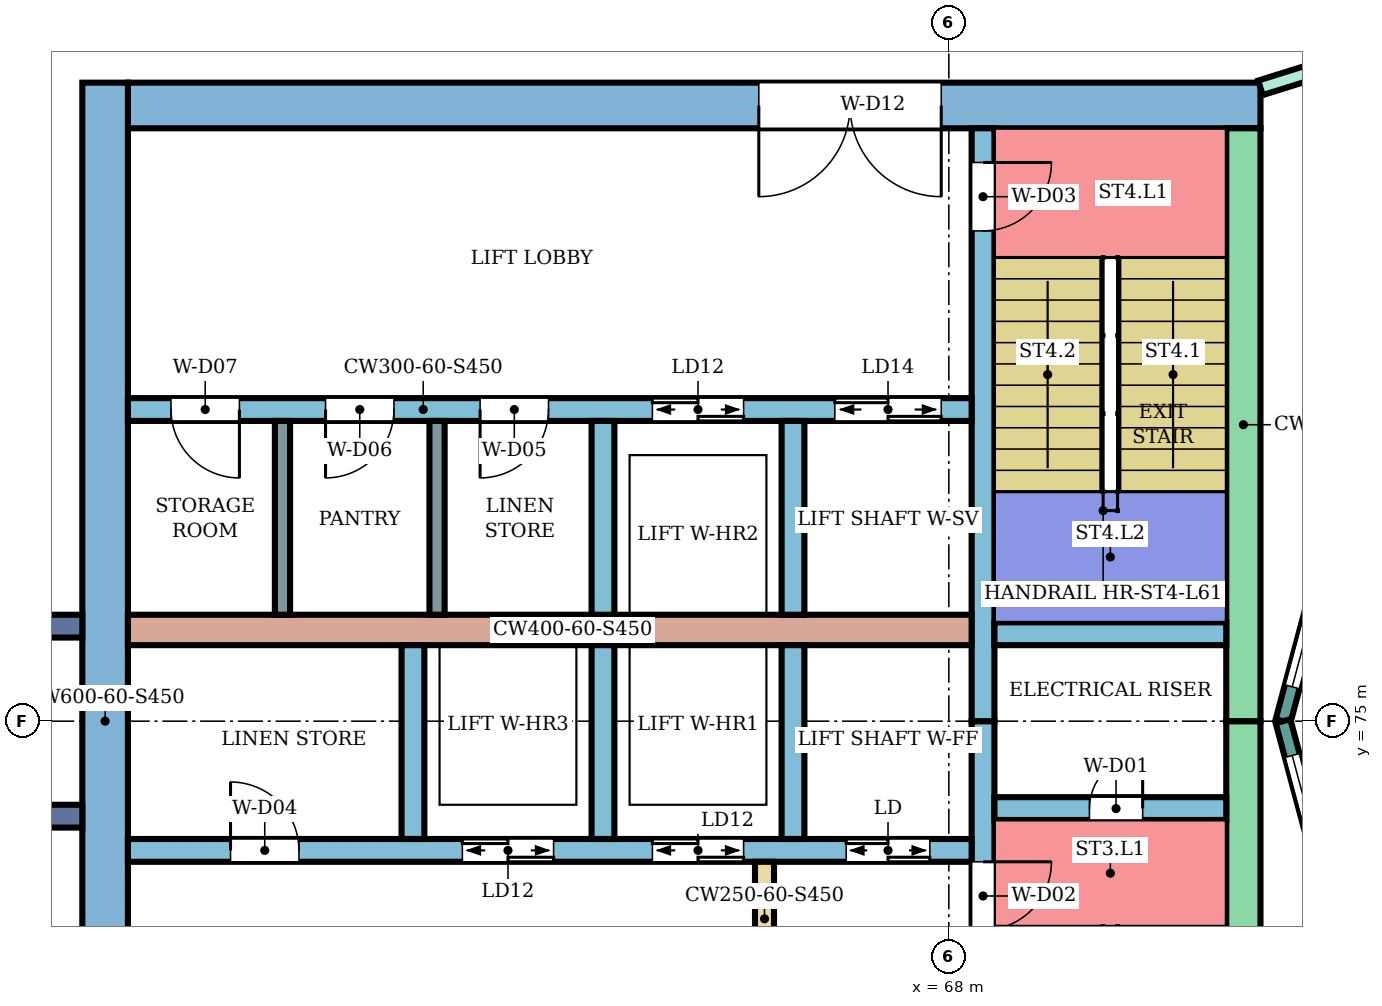
"""IFC4 building model, lengths in metres.
Left out: names, types, materials, properties, quantities, classifications, styles, units other than length and angle.
Written with IfcOpenShell. Run it as: python <this file> out.ifc"""

import sys

from ifc_helpers import new_model, si_unit, direction, frame, frame_2d, origin, place, context, subcontext, project, spatial, rectangle, extrude, element, fill, save


model = new_model("IFC4")
c1 = context("Model", 3, precision=1e-05, world=origin(), true_north=direction((0.0, 1.0)))
c2 = subcontext(c1, "Body", "Model", "MODEL_VIEW")
j1 = project(units=[si_unit("LENGTHUNIT", "METRE"), si_unit("PLANEANGLEUNIT", "RADIAN")], contexts=[c1])
p1 = place(None, origin())
s1 = spatial("IfcSite", under=j1, at=p1, CompositionType="ELEMENT")
p2 = place(p1, origin())
s2 = spatial("IfcBuilding", under=s1, at=p2, CompositionType="ELEMENT")
p3 = place(p2, frame((0.0, 0.0, 266.7)))
s3 = spatial("IfcBuildingStorey", under=s2, at=p3, CompositionType="ELEMENT", Elevation=266.7)
p4 = place(p3, frame((72.1, 83.1, 0.0), z_axis=(0.0, 0.0, 1.0), x_axis=(-1.0, 0.0, 0.0)))
e1 = element("IfcWall", 1, at=p4, inside=s3, PredefinedType="SHEAR", context=c2, shape_type="SweptSolid", body=[
    extrude(rectangle(XDim=14.9, YDim=0.6, at=frame_2d((7.45, 0.0))), origin(), (0.0, 0.0, 1.0), 3.75),
])
p5 = place(p4, frame((4.2, 0.0, 0.0)))
e2 = element("IfcOpeningElement", 2, at=p5, cuts=e1, PredefinedType="OPENING", context=c2, shape_type="SweptSolid", body=[
    extrude(rectangle(XDim=2.4, YDim=2.4, at=frame_2d((1.2, 1.2))), frame((0.0, 0.31, 0.0), z_axis=(0.0, -1.0, 0.0), x_axis=(1.0, 0.0, 0.0)), (0.0, 0.0, 1.0), 0.62),
])
for number, where, z_axis, x_axis in (
    (3, (71.875, 75.0, 0.0), (0.0, 0.0, 1.0), (0.0, -1.0, 0.0)),
    (4, (71.875, 82.8, 0.0), (0.0, 0.0, 1.0), (0.0, -1.0, 0.0)),
):
    element("IfcWall", number, at=place(p3, frame(where, z_axis=z_axis, x_axis=x_axis)), inside=s3, PredefinedType="SHEAR", context=c2, shape_type="SweptSolid", body=[
        extrude(rectangle(XDim=7.8, YDim=0.45, at=frame_2d((3.9, 0.0))), origin(), (0.0, 0.0, 1.0), 3.75),
    ])
p6 = place(p3, frame((56.9, 83.4, 0.0), z_axis=(0.0, 0.0, 1.0), x_axis=(0.0, -1.0, 0.0)))
e5 = element("IfcWall", 5, at=p6, inside=s3, PredefinedType="SHEAR", context=c2, shape_type="SweptSolid", body=[
    extrude(rectangle(XDim=16.8, YDim=0.6, at=frame_2d((8.4, 0.0))), origin(), (0.0, 0.0, 1.0), 3.75),
])
p7 = place(p3, frame((68.45, 75.0, 0.0), z_axis=(0.0, 0.0, 1.0), x_axis=(0.0, -1.0, 0.0)))
e6 = element("IfcWall", 6, at=p7, inside=s3, PredefinedType="SHEAR", context=c2, shape_type="SweptSolid", body=[
    extrude(rectangle(XDim=7.8, YDim=0.3, at=frame_2d((3.9, 0.0))), origin(), (0.0, 0.0, 1.0), 3.75),
])
p8 = place(p7, frame((1.85, 0.0, 0.0)))
e7 = element("IfcOpeningElement", 7, at=p8, cuts=e6, PredefinedType="OPENING", context=c2, shape_type="SweptSolid", body=[
    extrude(rectangle(XDim=0.9, YDim=2.1, at=frame_2d((0.45, 1.05))), frame((0.0, 0.16, 0.0), z_axis=(0.0, -1.0, 0.0), x_axis=(1.0, 0.0, 0.0)), (0.0, 0.0, 1.0), 0.32),
])
p9 = place(p3, frame((68.45, 82.8, 0.0), z_axis=(0.0, 0.0, 1.0), x_axis=(0.0, -1.0, 0.0)))
e8 = element("IfcWall", 8, at=p9, inside=s3, PredefinedType="SHEAR", context=c2, shape_type="SweptSolid", body=[
    extrude(rectangle(XDim=7.8, YDim=0.3, at=frame_2d((3.9, 0.0))), origin(), (0.0, 0.0, 1.0), 3.75),
])
p10 = place(p9, frame((0.45, 0.0, 0.0)))
e9 = element("IfcOpeningElement", 9, at=p10, cuts=e8, PredefinedType="OPENING", context=c2, shape_type="SweptSolid", body=[
    extrude(rectangle(XDim=0.9, YDim=2.1, at=frame_2d((0.45, 1.05))), frame((0.0, 0.16, 0.0), z_axis=(0.0, -1.0, 0.0), x_axis=(1.0, 0.0, 0.0)), (0.0, 0.0, 1.0), 0.32),
])
p11 = place(p3, frame((71.65, 73.85, 0.0), z_axis=(0.0, 0.0, 1.0), x_axis=(-1.0, 0.0, 0.0)))
e10 = element("IfcWall", 10, at=p11, inside=s3, PredefinedType="SHEAR", context=c2, shape_type="SweptSolid", body=[
    extrude(rectangle(XDim=3.05, YDim=0.3, at=frame_2d((1.525, 0.0))), origin(), (0.0, 0.0, 1.0), 3.75),
])
p12 = place(p11, frame((1.1, 0.0, 0.0)))
e11 = element("IfcOpeningElement", 11, at=p12, cuts=e10, PredefinedType="OPENING", context=c2, shape_type="SweptSolid", body=[
    extrude(rectangle(XDim=0.7, YDim=2.0, at=frame_2d((0.35, 1.0))), frame((0.0, 0.16, 0.0), z_axis=(0.0, -1.0, 0.0), x_axis=(1.0, 0.0, 0.0)), (0.0, 0.0, 1.0), 0.32),
])
p13 = place(p3, frame((71.65, 76.15, 0.0), z_axis=(0.0, 0.0, 1.0), x_axis=(-1.0, 0.0, 0.0)))
e12 = element("IfcWall", 12, at=p13, inside=s3, PredefinedType="SHEAR", context=c2, shape_type="SweptSolid", body=[
    extrude(rectangle(XDim=3.05, YDim=0.3, at=frame_2d((1.525, 0.0))), origin(), (0.0, 0.0, 1.0), 3.75),
])
p14 = place(p3, frame((68.3, 73.3, 0.0), z_axis=(0.0, 0.0, 1.0), x_axis=(-1.0, 0.0, 0.0)))
e13 = element("IfcWall", 13, at=p14, inside=s3, PredefinedType="SHEAR", context=c2, shape_type="SweptSolid", body=[
    extrude(rectangle(XDim=11.1, YDim=0.3, at=frame_2d((5.55, 0.0))), origin(), (0.0, 0.0, 1.0), 3.75),
])
p15 = place(p14, frame((0.55, 0.0, 0.0)))
e14 = element("IfcOpeningElement", 14, at=p15, cuts=e13, PredefinedType="OPENING", context=c2, shape_type="SweptSolid", body=[
    extrude(rectangle(XDim=1.1, YDim=2.1, at=frame_2d((0.55, 1.05))), frame((0.0, 0.16, 0.0), z_axis=(0.0, -1.0, 0.0), x_axis=(1.0, 0.0, 0.0)), (0.0, 0.0, 1.0), 0.32),
])
p16 = place(p14, frame((3.0, 0.0, 0.0)))
e15 = element("IfcOpeningElement", 15, at=p16, cuts=e13, PredefinedType="OPENING", context=c2, shape_type="SweptSolid", body=[
    extrude(rectangle(XDim=1.2, YDim=2.1, at=frame_2d((0.6, 1.05))), frame((0.0, 0.16, 0.0), z_axis=(0.0, -1.0, 0.0), x_axis=(1.0, 0.0, 0.0)), (0.0, 0.0, 1.0), 0.32),
])
p17 = place(p14, frame((5.5, 0.0, 0.0)))
e16 = element("IfcOpeningElement", 16, at=p17, cuts=e13, PredefinedType="OPENING", context=c2, shape_type="SweptSolid", body=[
    extrude(rectangle(XDim=1.2, YDim=2.1, at=frame_2d((0.6, 1.05))), frame((0.0, 0.16, 0.0), z_axis=(0.0, -1.0, 0.0), x_axis=(1.0, 0.0, 0.0)), (0.0, 0.0, 1.0), 0.32),
])
p18 = place(p14, frame((8.85, 0.0, 0.0)))
e17 = element("IfcOpeningElement", 17, at=p18, cuts=e13, PredefinedType="OPENING", context=c2, shape_type="SweptSolid", body=[
    extrude(rectangle(XDim=0.9, YDim=2.1, at=frame_2d((0.45, 1.05))), frame((0.0, 0.16, 0.0), z_axis=(0.0, -1.0, 0.0), x_axis=(1.0, 0.0, 0.0)), (0.0, 0.0, 1.0), 0.32),
])
p19 = place(p3, frame((68.3, 76.2, 0.0), z_axis=(0.0, 0.0, 1.0), x_axis=(-1.0, 0.0, 0.0)))
e18 = element("IfcWall", 18, at=p19, inside=s3, PredefinedType="SHEAR", context=c2, shape_type="SweptSolid", body=[
    extrude(rectangle(XDim=11.1, YDim=0.4, at=frame_2d((5.55, 0.0))), origin(), (0.0, 0.0, 1.0), 3.75),
])
p20 = place(p3, frame((68.3, 79.1, 0.0), z_axis=(0.0, 0.0, 1.0), x_axis=(-1.0, 0.0, 0.0)))
e19 = element("IfcWall", 19, at=p20, inside=s3, PredefinedType="SHEAR", context=c2, shape_type="SweptSolid", body=[
    extrude(rectangle(XDim=11.1, YDim=0.3, at=frame_2d((5.55, 0.0))), origin(), (0.0, 0.0, 1.0), 3.75),
])
p21 = place(p20, frame((0.4, 0.0, 0.0)))
e20 = element("IfcOpeningElement", 20, at=p21, cuts=e19, PredefinedType="OPENING", context=c2, shape_type="SweptSolid", body=[
    extrude(rectangle(XDim=1.4, YDim=2.1, at=frame_2d((0.7, 1.05))), frame((0.0, 0.16, 0.0), z_axis=(0.0, -1.0, 0.0), x_axis=(1.0, 0.0, 0.0)), (0.0, 0.0, 1.0), 0.32),
])
p22 = place(p20, frame((3.0, 0.0, 0.0)))
e21 = element("IfcOpeningElement", 21, at=p22, cuts=e19, PredefinedType="OPENING", context=c2, shape_type="SweptSolid", body=[
    extrude(rectangle(XDim=1.2, YDim=2.1, at=frame_2d((0.6, 1.05))), frame((0.0, 0.16, 0.0), z_axis=(0.0, -1.0, 0.0), x_axis=(1.0, 0.0, 0.0)), (0.0, 0.0, 1.0), 0.32),
])
p23 = place(p20, frame((5.567, 0.0, 0.0)))
e22 = element("IfcOpeningElement", 22, at=p23, cuts=e19, PredefinedType="OPENING", context=c2, shape_type="SweptSolid", body=[
    extrude(rectangle(XDim=0.9, YDim=2.1, at=frame_2d((0.45, 1.05))), frame((0.0, 0.16, 0.0), z_axis=(0.0, -1.0, 0.0), x_axis=(1.0, 0.0, 0.0)), (0.0, 0.0, 1.0), 0.32),
])
p24 = place(p20, frame((7.6, 0.0, 0.0)))
e23 = element("IfcOpeningElement", 23, at=p24, cuts=e19, PredefinedType="OPENING", context=c2, shape_type="SweptSolid", body=[
    extrude(rectangle(XDim=0.9, YDim=2.1, at=frame_2d((0.45, 1.05))), frame((0.0, 0.16, 0.0), z_axis=(0.0, -1.0, 0.0), x_axis=(1.0, 0.0, 0.0)), (0.0, 0.0, 1.0), 0.32),
])
p25 = place(p20, frame((9.633, 0.0, 0.0)))
e24 = element("IfcOpeningElement", 24, at=p25, cuts=e19, PredefinedType="OPENING", context=c2, shape_type="SweptSolid", body=[
    extrude(rectangle(XDim=0.9, YDim=2.1, at=frame_2d((0.45, 1.05))), frame((0.0, 0.16, 0.0), z_axis=(0.0, -1.0, 0.0), x_axis=(1.0, 0.0, 0.0)), (0.0, 0.0, 1.0), 0.32),
])
for number, where, z_axis, x_axis in (
    (25, (65.95, 76.0, 0.0), (0.0, 0.0, 1.0), (0.0, -1.0, 0.0)),
    (26, (63.45, 76.0, 0.0), (0.0, 0.0, 1.0), (0.0, -1.0, 0.0)),
    (27, (60.95, 76.0, 0.0), (0.0, 0.0, 1.0), (0.0, -1.0, 0.0)),
    (28, (65.95, 78.95, 0.0), (0.0, 0.0, 1.0), (0.0, -1.0, 0.0)),
    (29, (63.45, 78.95, 0.0), (0.0, 0.0, 1.0), (0.0, -1.0, 0.0)),
):
    element("IfcWall", number, at=place(p3, frame(where, z_axis=z_axis, x_axis=x_axis)), inside=s3, PredefinedType="SHEAR", context=c2, shape_type="SweptSolid", body=[
        extrude(rectangle(XDim=2.55, YDim=0.3, at=frame_2d((1.275, 0.0))), origin(), (0.0, 0.0, 1.0), 3.75),
    ])
p26 = place(p3, frame((65.575, 73.15, 0.0), z_axis=(0.0, 0.0, 1.0), x_axis=(0.0, -1.0, 0.0)))
e30 = element("IfcWall", 30, at=p26, inside=s3, PredefinedType="SHEAR", context=c2, shape_type="SweptSolid", body=[
    extrude(rectangle(XDim=1.5, YDim=0.25, at=frame_2d((0.75, 0.0))), origin(), (0.0, 0.0, 1.0), 3.75),
])
for number, where, z_axis, x_axis in (
    (31, (56.6, 76.25, 0.0), (0.0, 0.0, 1.0), (-1.0, 0.0, 0.0)),
    (32, (56.6, 73.75, 0.0), (0.0, 0.0, 1.0), (-1.0, 0.0, 0.0)),
):
    element("IfcWall", number, at=place(p3, frame(where, z_axis=z_axis, x_axis=x_axis)), inside=s3, PredefinedType="NOTDEFINED", context=c2, shape_type="SweptSolid", body=[
        extrude(rectangle(XDim=2.416, YDim=0.3, at=frame_2d((1.208, 0.0))), origin(), (0.0, 0.0, 1.0), 4.2),
    ])
p27 = place(p3, frame((73.415, 78.802, 0.0), z_axis=(0.0, 0.0, 1.0), x_axis=(-0.258789828301, -0.965933654434, 0.0)))
e33 = element("IfcWall", 33, at=p27, inside=s3, PredefinedType="NOTDEFINED", context=c2, shape_type="SweptSolid", body=[
    extrude(rectangle(XDim=3.936, YDim=0.2, at=frame_2d((1.968, 0.0))), origin(), (0.0, 0.0, 1.0), 4.2),
])
p28 = place(p27, frame((0.468, 0.0, 0.9)))
e34 = element("IfcOpeningElement", 34, at=p28, cuts=e33, PredefinedType="OPENING", context=c2, shape_type="SweptSolid", body=[
    extrude(rectangle(XDim=3.0, YDim=2.3, at=frame_2d((1.5, 1.15))), frame((0.0, 0.11, 0.0), z_axis=(0.0, -1.0, 0.0), x_axis=(1.0, 0.0, 0.0)), (0.0, 0.0, 1.0), 0.22),
])
p29 = place(p3, frame((72.396, 75.0, 0.0), z_axis=(0.0, 0.0, 1.0), x_axis=(0.258789828301, -0.965933654434, 0.0)))
e35 = element("IfcWall", 35, at=p29, inside=s3, PredefinedType="NOTDEFINED", context=c2, shape_type="SweptSolid", body=[
    extrude(rectangle(XDim=3.936, YDim=0.2, at=frame_2d((1.968, 0.0))), origin(), (0.0, 0.0, 1.0), 4.2),
])
p30 = place(p29, frame((0.468, 0.0, 0.9)))
e36 = element("IfcOpeningElement", 36, at=p30, cuts=e35, PredefinedType="OPENING", context=c2, shape_type="SweptSolid", body=[
    extrude(rectangle(XDim=3.0, YDim=2.3, at=frame_2d((1.5, 1.15))), frame((0.0, 0.11, 0.0), z_axis=(0.0, -1.0, 0.0), x_axis=(1.0, 0.0, 0.0)), (0.0, 0.0, 1.0), 0.22),
])
p31 = place(p3, frame((72.1, 83.332, 0.0), z_axis=(0.0, 0.0, 1.0), x_axis=(0.954233106619, 0.299063836383, 0.0)))
e37 = element("IfcWall", 37, at=p31, inside=s3, PredefinedType="PARTITIONING", context=c2, shape_type="SweptSolid", body=[
    extrude(rectangle(XDim=2.414, YDim=0.2, at=frame_2d((1.207, 0.0))), origin(), (0.0, 0.0, 1.0), 3.75),
])
p32 = place(p31, frame((0.762, 0.0, 0.0)))
e38 = element("IfcOpeningElement", 38, at=p32, cuts=e37, PredefinedType="OPENING", context=c2, shape_type="SweptSolid", body=[
    extrude(rectangle(XDim=0.9, YDim=2.1, at=frame_2d((0.45, 1.05))), frame((0.0, 0.11, 0.0), z_axis=(0.0, -1.0, 0.0), x_axis=(1.0, 0.0, 0.0)), (0.0, 0.0, 1.0), 0.22),
])
for number, where, z_axis, x_axis in (
    (39, (61.267, 78.95, 0.0), (0.0, 0.0, 1.0), (0.0, -1.0, 0.0)),
    (40, (59.233, 78.95, 0.0), (0.0, 0.0, 1.0), (0.0, -1.0, 0.0)),
):
    element("IfcWall", number, at=place(p3, frame(where, z_axis=z_axis, x_axis=x_axis)), inside=s3, PredefinedType="PARTITIONING", context=c2, shape_type="SweptSolid", body=[
        extrude(rectangle(XDim=2.55, YDim=0.2, at=frame_2d((1.275, 0.0))), origin(), (0.0, 0.0, 1.0), 3.75),
    ])
p33 = place(p28, origin())
e41 = element("IfcWindow", 41, at=p33, inside=s3, PartitioningType="SINGLE_PANEL", PredefinedType="WINDOW", context=c2, shape_type="SweptSolid", body=[
    extrude(rectangle(XDim=3.0, YDim=2.3, at=frame_2d((1.5, 1.15))), frame((0.0, 0.03, 0.0), z_axis=(0.0, -1.0, 0.0), x_axis=(1.0, 0.0, 0.0)), (0.0, 0.0, 1.0), 0.06),
])
fill(e34, e41)
p34 = place(p30, origin())
e42 = element("IfcWindow", 42, at=p34, inside=s3, PartitioningType="SINGLE_PANEL", PredefinedType="WINDOW", context=c2, shape_type="SweptSolid", body=[
    extrude(rectangle(XDim=3.0, YDim=2.3, at=frame_2d((1.5, 1.15))), frame((0.0, 0.03, 0.0), z_axis=(0.0, -1.0, 0.0), x_axis=(1.0, 0.0, 0.0)), (0.0, 0.0, 1.0), 0.06),
])
fill(e36, e42)
p35 = place(p12, frame((0.7, 0.0, 0.0), z_axis=(0.0, 0.0, 1.0), x_axis=(-1.0, 0.0, 0.0)))
e43 = element("IfcDoor", 43, at=p35, inside=s3, OperationType="SINGLE_SWING_RIGHT", PredefinedType="DOOR", context=c2, shape_type="SweptSolid", body=[
    extrude(rectangle(XDim=0.7, YDim=2.0, at=frame_2d((0.35, 1.0))), frame((0.0, 0.025, 0.0), z_axis=(0.0, -1.0, 0.0), x_axis=(1.0, 0.0, 0.0)), (0.0, 0.0, 1.0), 0.05),
])
fill(e11, e43)
p36 = place(p8, origin())
e44 = element("IfcDoor", 44, at=p36, inside=s3, OperationType="SINGLE_SWING_LEFT", PredefinedType="DOOR", context=c2, shape_type="SweptSolid", body=[
    extrude(rectangle(XDim=0.9, YDim=2.1, at=frame_2d((0.45, 1.05))), frame((0.0, 0.025, 0.0), z_axis=(0.0, -1.0, 0.0), x_axis=(1.0, 0.0, 0.0)), (0.0, 0.0, 1.0), 0.05),
])
fill(e7, e44)
p37 = place(p10, origin())
e45 = element("IfcDoor", 45, at=p37, inside=s3, OperationType="SINGLE_SWING_LEFT", PredefinedType="DOOR", context=c2, shape_type="SweptSolid", body=[
    extrude(rectangle(XDim=0.9, YDim=2.1, at=frame_2d((0.45, 1.05))), frame((0.0, 0.025, 0.0), z_axis=(0.0, -1.0, 0.0), x_axis=(1.0, 0.0, 0.0)), (0.0, 0.0, 1.0), 0.05),
])
fill(e9, e45)
p38 = place(p15, origin())
e46 = element("IfcDoor", 46, at=p38, inside=s3, OperationType="DOUBLE_DOOR_SLIDING", PredefinedType="DOOR", context=c2, shape_type="SweptSolid", body=[
    extrude(rectangle(XDim=1.1, YDim=2.1, at=frame_2d((0.55, 1.05))), frame((0.0, 0.025, 0.0), z_axis=(0.0, -1.0, 0.0), x_axis=(1.0, 0.0, 0.0)), (0.0, 0.0, 1.0), 0.05),
])
fill(e14, e46)
p39 = place(p16, origin())
e47 = element("IfcDoor", 47, at=p39, inside=s3, OperationType="DOUBLE_DOOR_SLIDING", PredefinedType="DOOR", context=c2, shape_type="SweptSolid", body=[
    extrude(rectangle(XDim=1.2, YDim=2.1, at=frame_2d((0.6, 1.05))), frame((0.0, 0.025, 0.0), z_axis=(0.0, -1.0, 0.0), x_axis=(1.0, 0.0, 0.0)), (0.0, 0.0, 1.0), 0.05),
])
fill(e15, e47)
p40 = place(p17, origin())
e48 = element("IfcDoor", 48, at=p40, inside=s3, OperationType="DOUBLE_DOOR_SLIDING", PredefinedType="DOOR", context=c2, shape_type="SweptSolid", body=[
    extrude(rectangle(XDim=1.2, YDim=2.1, at=frame_2d((0.6, 1.05))), frame((0.0, 0.025, 0.0), z_axis=(0.0, -1.0, 0.0), x_axis=(1.0, 0.0, 0.0)), (0.0, 0.0, 1.0), 0.05),
])
fill(e16, e48)
p41 = place(p18, frame((0.9, 0.0, 0.0), z_axis=(0.0, 0.0, 1.0), x_axis=(-1.0, 0.0, 0.0)))
e49 = element("IfcDoor", 49, at=p41, inside=s3, OperationType="SINGLE_SWING_LEFT", PredefinedType="DOOR", context=c2, shape_type="SweptSolid", body=[
    extrude(rectangle(XDim=0.9, YDim=2.1, at=frame_2d((0.45, 1.05))), frame((0.0, 0.025, 0.0), z_axis=(0.0, -1.0, 0.0), x_axis=(1.0, 0.0, 0.0)), (0.0, 0.0, 1.0), 0.05),
])
fill(e17, e49)
p42 = place(p21, origin())
e50 = element("IfcDoor", 50, at=p42, inside=s3, OperationType="DOUBLE_DOOR_SLIDING", PredefinedType="DOOR", context=c2, shape_type="SweptSolid", body=[
    extrude(rectangle(XDim=1.4, YDim=2.1, at=frame_2d((0.7, 1.05))), frame((0.0, 0.025, 0.0), z_axis=(0.0, -1.0, 0.0), x_axis=(1.0, 0.0, 0.0)), (0.0, 0.0, 1.0), 0.05),
])
fill(e20, e50)
p43 = place(p22, origin())
e51 = element("IfcDoor", 51, at=p43, inside=s3, OperationType="DOUBLE_DOOR_SLIDING", PredefinedType="DOOR", context=c2, shape_type="SweptSolid", body=[
    extrude(rectangle(XDim=1.2, YDim=2.1, at=frame_2d((0.6, 1.05))), frame((0.0, 0.025, 0.0), z_axis=(0.0, -1.0, 0.0), x_axis=(1.0, 0.0, 0.0)), (0.0, 0.0, 1.0), 0.05),
])
fill(e21, e51)
p44 = place(p23, origin())
e52 = element("IfcDoor", 52, at=p44, inside=s3, OperationType="SINGLE_SWING_RIGHT", PredefinedType="DOOR", context=c2, shape_type="SweptSolid", body=[
    extrude(rectangle(XDim=0.9, YDim=2.1, at=frame_2d((0.45, 1.05))), frame((0.0, 0.025, 0.0), z_axis=(0.0, -1.0, 0.0), x_axis=(1.0, 0.0, 0.0)), (0.0, 0.0, 1.0), 0.05),
])
fill(e22, e52)
p45 = place(p24, origin())
e53 = element("IfcDoor", 53, at=p45, inside=s3, OperationType="SINGLE_SWING_RIGHT", PredefinedType="DOOR", context=c2, shape_type="SweptSolid", body=[
    extrude(rectangle(XDim=0.9, YDim=2.1, at=frame_2d((0.45, 1.05))), frame((0.0, 0.025, 0.0), z_axis=(0.0, -1.0, 0.0), x_axis=(1.0, 0.0, 0.0)), (0.0, 0.0, 1.0), 0.05),
])
fill(e23, e53)
p46 = place(p25, origin())
e54 = element("IfcDoor", 54, at=p46, inside=s3, OperationType="SINGLE_SWING_LEFT", PredefinedType="DOOR", context=c2, shape_type="SweptSolid", body=[
    extrude(rectangle(XDim=0.9, YDim=2.1, at=frame_2d((0.45, 1.05))), frame((0.0, 0.025, 0.0), z_axis=(0.0, -1.0, 0.0), x_axis=(1.0, 0.0, 0.0)), (0.0, 0.0, 1.0), 0.05),
])
fill(e24, e54)
p47 = place(p5, origin())
e55 = element("IfcDoor", 55, at=p47, inside=s3, OperationType="DOUBLE_DOOR_SINGLE_SWING", PredefinedType="DOOR", context=c2, shape_type="SweptSolid", body=[
    extrude(rectangle(XDim=2.4, YDim=2.4, at=frame_2d((1.2, 1.2))), frame((0.0, 0.025, 0.0), z_axis=(0.0, -1.0, 0.0), x_axis=(1.0, 0.0, 0.0)), (0.0, 0.0, 1.0), 0.05),
])
fill(e2, e55)
save(model, sys.argv[1])
